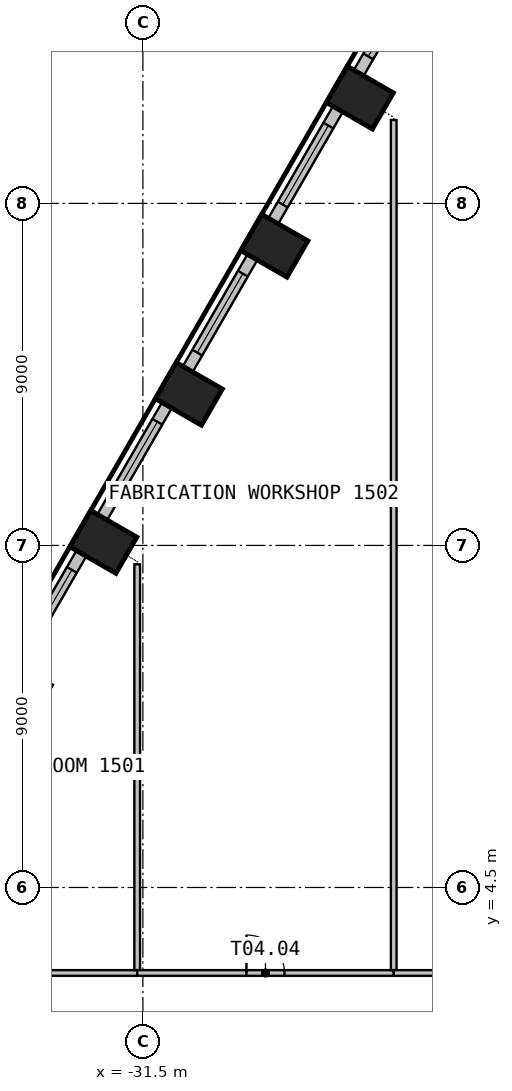
"""IFC4 building model, lengths in metres.
Left out: names, types, materials, properties, quantities, classifications, styles, units other than length and angle.
Written with IfcOpenShell. Run it as: python <this file> out.ifc"""

import sys

from ifc_helpers import new_model, si_unit, direction, frame, frame_2d, origin, origin_2d, place, context, subcontext, project, spatial, rectangle, extrude, element, fill, save


model = new_model("IFC4")
c1 = context("Model", 3, precision=1e-05, world=origin(), true_north=direction((0.0, 1.0)))
c2 = subcontext(c1, "Body", "Model", "MODEL_VIEW")
j1 = project(units=[si_unit("LENGTHUNIT", "METRE"), si_unit("PLANEANGLEUNIT", "RADIAN")], contexts=[c1])
p1 = place(None, origin())
s1 = spatial("IfcSite", under=j1, at=p1, CompositionType="ELEMENT")
p2 = place(p1, origin())
s2 = spatial("IfcBuilding", under=s1, at=p2, CompositionType="ELEMENT")
p3 = place(p2, frame((0.0, 0.0, 65.1)))
s3 = spatial("IfcBuildingStorey", under=s2, at=p3, CompositionType="ELEMENT", Elevation=65.1)
for number, where, z_axis, x_axis in (
    (1, (-25.791, 25.283, 0.0), (0.0, 0.0, 1.0), (-0.5, -0.866, 0.0)),
    (2, (-28.041, 21.385, 0.0), (0.0, 0.0, 1.0), (-0.5, -0.866, 0.0)),
    (3, (-30.291, 17.489, 0.0), (0.0, 0.0, 1.0), (-0.5, -0.866, 0.0)),
    (4, (-32.541, 13.591, 0.0), (0.0, 0.0, 1.0), (-0.5, -0.866, 0.0)),
):
    element("IfcColumn", number, at=place(p3, frame(where, z_axis=z_axis, x_axis=x_axis)), inside=s3, PredefinedType="COLUMN", context=c2, shape_type="SweptSolid", body=[
        extrude(rectangle(XDim=1.1, YDim=1.4, at=origin_2d()), origin(), (0.0, 0.0, 1.0), 3.525),
    ])
p4 = place(p3, frame((-24.273, 28.611, 0.0), z_axis=(0.0, 0.0, 1.0), x_axis=(-0.499995950774, -0.866027741594, 0.0)))
e5 = element("IfcWall", 5, at=p4, inside=s3, PredefinedType="SOLIDWALL", context=c2, shape_type="SweptSolid", body=[
    extrude(rectangle(XDim=3.091, YDim=0.3, at=frame_2d((1.545, 0.0))), origin(), (0.0, 0.0, 1.0), 3.525),
])
p5 = place(p4, frame((0.191, 0.0, 0.9)))
e6 = element("IfcOpeningElement", 6, at=p5, cuts=e5, PredefinedType="OPENING", context=c2, shape_type="SweptSolid", body=[
    extrude(rectangle(XDim=2.4, YDim=2.1, at=frame_2d((1.2, 1.05))), frame((0.0, 0.16, 0.0), z_axis=(0.0, -1.0, 0.0), x_axis=(1.0, 0.0, 0.0)), (0.0, 0.0, 1.0), 0.32),
])
p6 = place(p3, frame((-26.369, 24.981, 0.0), z_axis=(0.0, 0.0, 1.0), x_axis=(-0.499993955907, -0.866028893315, 0.0)))
e7 = element("IfcWall", 7, at=p6, inside=s3, PredefinedType="SOLIDWALL", context=c2, shape_type="SweptSolid", body=[
    extrude(rectangle(XDim=3.399, YDim=0.3, at=frame_2d((1.699, 0.0))), origin(), (0.0, 0.0, 1.0), 3.525),
])
p7 = place(p6, frame((0.5, 0.0, 0.9)))
e8 = element("IfcOpeningElement", 8, at=p7, cuts=e7, PredefinedType="OPENING", context=c2, shape_type="SweptSolid", body=[
    extrude(rectangle(XDim=2.4, YDim=2.1, at=frame_2d((1.2, 1.05))), frame((0.0, 0.16, 0.0), z_axis=(0.0, -1.0, 0.0), x_axis=(1.0, 0.0, 0.0)), (0.0, 0.0, 1.0), 0.32),
])
p8 = place(p3, frame((-28.619, 21.084, 0.0), z_axis=(0.0, 0.0, 1.0), x_axis=(-0.499993955907, -0.866028893315, 0.0)))
e9 = element("IfcWall", 9, at=p8, inside=s3, PredefinedType="SOLIDWALL", context=c2, shape_type="SweptSolid", body=[
    extrude(rectangle(XDim=3.399, YDim=0.3, at=frame_2d((1.699, 0.0))), origin(), (0.0, 0.0, 1.0), 3.525),
])
p9 = place(p8, frame((0.5, 0.0, 0.9)))
e10 = element("IfcOpeningElement", 10, at=p9, cuts=e9, PredefinedType="OPENING", context=c2, shape_type="SweptSolid", body=[
    extrude(rectangle(XDim=2.4, YDim=2.1, at=frame_2d((1.2, 1.05))), frame((0.0, 0.16, 0.0), z_axis=(0.0, -1.0, 0.0), x_axis=(1.0, 0.0, 0.0)), (0.0, 0.0, 1.0), 0.32),
])
p10 = place(p3, frame((-30.869, 17.187, 0.0), z_axis=(0.0, 0.0, 1.0), x_axis=(-0.499993955907, -0.866028893315, 0.0)))
e11 = element("IfcWall", 11, at=p10, inside=s3, PredefinedType="SOLIDWALL", context=c2, shape_type="SweptSolid", body=[
    extrude(rectangle(XDim=3.399, YDim=0.3, at=frame_2d((1.699, 0.0))), origin(), (0.0, 0.0, 1.0), 3.525),
])
p11 = place(p10, frame((0.5, 0.0, 0.9)))
e12 = element("IfcOpeningElement", 12, at=p11, cuts=e11, PredefinedType="OPENING", context=c2, shape_type="SweptSolid", body=[
    extrude(rectangle(XDim=2.4, YDim=2.1, at=frame_2d((1.2, 1.05))), frame((0.0, 0.16, 0.0), z_axis=(0.0, -1.0, 0.0), x_axis=(1.0, 0.0, 0.0)), (0.0, 0.0, 1.0), 0.32),
])
p12 = place(p3, frame((-33.119, 13.29, 0.0), z_axis=(0.0, 0.0, 1.0), x_axis=(-0.499993955907, -0.866028893315, 0.0)))
e13 = element("IfcWall", 13, at=p12, inside=s3, PredefinedType="SOLIDWALL", context=c2, shape_type="SweptSolid", body=[
    extrude(rectangle(XDim=3.399, YDim=0.3, at=frame_2d((1.699, 0.0))), origin(), (0.0, 0.0, 1.0), 3.525),
])
p13 = place(p12, frame((0.5, 0.0, 0.9)))
e14 = element("IfcOpeningElement", 14, at=p13, cuts=e13, PredefinedType="OPENING", context=c2, shape_type="SweptSolid", body=[
    extrude(rectangle(XDim=2.4, YDim=2.1, at=frame_2d((1.2, 1.05))), frame((0.0, 0.16, 0.0), z_axis=(0.0, -1.0, 0.0), x_axis=(1.0, 0.0, 0.0)), (0.0, 0.0, 1.0), 0.32),
])
p14 = place(p3, frame((-38.233, 2.25, 0.0), z_axis=(0.0, 0.0, 1.0), x_axis=(1.0, 0.0, 0.0)))
e15 = element("IfcWall", 15, at=p14, inside=s3, PredefinedType="PARTITIONING", context=c2, shape_type="SweptSolid", body=[
    extrude(rectangle(XDim=6.583, YDim=0.15, at=frame_2d((3.292, 0.0))), origin(), (0.0, 0.0, 1.0), 3.525),
])
p15 = place(p14, frame((2.792, 0.0, 0.0)))
e16 = element("IfcOpeningElement", 16, at=p15, cuts=e15, PredefinedType="OPENING", context=c2, shape_type="SweptSolid", body=[
    extrude(rectangle(XDim=1.0, YDim=2.1, at=frame_2d((0.5, 1.05))), frame((0.0, 0.085, 0.0), z_axis=(0.0, -1.0, 0.0), x_axis=(1.0, 0.0, 0.0)), (0.0, 0.0, 1.0), 0.17),
])
p16 = place(p3, frame((-31.65, 13.002, 0.0), z_axis=(0.0, 0.0, 1.0), x_axis=(0.0, -1.0, 0.0)))
e17 = element("IfcWall", 17, at=p16, inside=s3, PredefinedType="PARTITIONING", context=c2, shape_type="SweptSolid", body=[
    extrude(rectangle(XDim=10.677, YDim=0.15, at=frame_2d((5.338, 0.0))), origin(), (0.0, 0.0, 1.0), 3.525),
])
p17 = place(p3, frame((-31.65, 2.25, 0.0), z_axis=(0.0, 0.0, 1.0), x_axis=(1.0, 0.0, 0.0)))
e18 = element("IfcWall", 18, at=p17, inside=s3, PredefinedType="PARTITIONING", context=c2, shape_type="SweptSolid", body=[
    extrude(rectangle(XDim=6.75, YDim=0.15, at=frame_2d((3.375, 0.0))), origin(), (0.0, 0.0, 1.0), 3.525),
])
p18 = place(p17, frame((2.875, 0.0, 0.0)))
e19 = element("IfcOpeningElement", 19, at=p18, cuts=e18, PredefinedType="OPENING", context=c2, shape_type="SweptSolid", body=[
    extrude(rectangle(XDim=1.0, YDim=2.1, at=frame_2d((0.5, 1.05))), frame((0.0, 0.085, 0.0), z_axis=(0.0, -1.0, 0.0), x_axis=(1.0, 0.0, 0.0)), (0.0, 0.0, 1.0), 0.17),
])
p19 = place(p3, frame((-24.9, 24.693, 0.0), z_axis=(0.0, 0.0, 1.0), x_axis=(0.0, -1.0, 0.0)))
e20 = element("IfcWall", 20, at=p19, inside=s3, PredefinedType="PARTITIONING", context=c2, shape_type="SweptSolid", body=[
    extrude(rectangle(XDim=22.368, YDim=0.15, at=frame_2d((11.184, 0.0))), origin(), (0.0, 0.0, 1.0), 3.525),
])
p20 = place(p3, frame((-24.9, 2.25, 0.0), z_axis=(0.0, 0.0, 1.0), x_axis=(1.0, 0.0, 0.0)))
e21 = element("IfcWall", 21, at=p20, inside=s3, PredefinedType="PARTITIONING", context=c2, shape_type="SweptSolid", body=[
    extrude(rectangle(XDim=4.575, YDim=0.15, at=frame_2d((2.288, 0.0))), origin(), (0.0, 0.0, 1.0), 3.525),
])
p21 = place(p5, origin())
e22 = element("IfcWindow", 22, at=p21, inside=s3, PartitioningType="SINGLE_PANEL", PredefinedType="WINDOW", context=c2, shape_type="SweptSolid", body=[
    extrude(rectangle(XDim=2.4, YDim=2.1, at=frame_2d((1.2, 1.05))), frame((0.0, 0.03, 0.0), z_axis=(0.0, -1.0, 0.0), x_axis=(1.0, 0.0, 0.0)), (0.0, 0.0, 1.0), 0.06),
])
fill(e6, e22)
p22 = place(p7, origin())
e23 = element("IfcWindow", 23, at=p22, inside=s3, PartitioningType="SINGLE_PANEL", PredefinedType="WINDOW", context=c2, shape_type="SweptSolid", body=[
    extrude(rectangle(XDim=2.4, YDim=2.1, at=frame_2d((1.2, 1.05))), frame((0.0, 0.03, 0.0), z_axis=(0.0, -1.0, 0.0), x_axis=(1.0, 0.0, 0.0)), (0.0, 0.0, 1.0), 0.06),
])
fill(e8, e23)
p23 = place(p9, origin())
e24 = element("IfcWindow", 24, at=p23, inside=s3, PartitioningType="SINGLE_PANEL", PredefinedType="WINDOW", context=c2, shape_type="SweptSolid", body=[
    extrude(rectangle(XDim=2.4, YDim=2.1, at=frame_2d((1.2, 1.05))), frame((0.0, 0.03, 0.0), z_axis=(0.0, -1.0, 0.0), x_axis=(1.0, 0.0, 0.0)), (0.0, 0.0, 1.0), 0.06),
])
fill(e10, e24)
p24 = place(p11, origin())
e25 = element("IfcWindow", 25, at=p24, inside=s3, PartitioningType="SINGLE_PANEL", PredefinedType="WINDOW", context=c2, shape_type="SweptSolid", body=[
    extrude(rectangle(XDim=2.4, YDim=2.1, at=frame_2d((1.2, 1.05))), frame((0.0, 0.03, 0.0), z_axis=(0.0, -1.0, 0.0), x_axis=(1.0, 0.0, 0.0)), (0.0, 0.0, 1.0), 0.06),
])
fill(e12, e25)
p25 = place(p13, origin())
e26 = element("IfcWindow", 26, at=p25, inside=s3, PartitioningType="SINGLE_PANEL", PredefinedType="WINDOW", context=c2, shape_type="SweptSolid", body=[
    extrude(rectangle(XDim=2.4, YDim=2.1, at=frame_2d((1.2, 1.05))), frame((0.0, 0.03, 0.0), z_axis=(0.0, -1.0, 0.0), x_axis=(1.0, 0.0, 0.0)), (0.0, 0.0, 1.0), 0.06),
])
fill(e14, e26)
p26 = place(p18, origin())
e27 = element("IfcDoor", 27, at=p26, inside=s3, OperationType="SINGLE_SWING_RIGHT", PredefinedType="DOOR", context=c2, shape_type="SweptSolid", body=[
    extrude(rectangle(XDim=1.0, YDim=2.1, at=frame_2d((0.5, 1.05))), frame((0.0, 0.025, 0.0), z_axis=(0.0, -1.0, 0.0), x_axis=(1.0, 0.0, 0.0)), (0.0, 0.0, 1.0), 0.05),
])
fill(e19, e27)
save(model, sys.argv[1])
